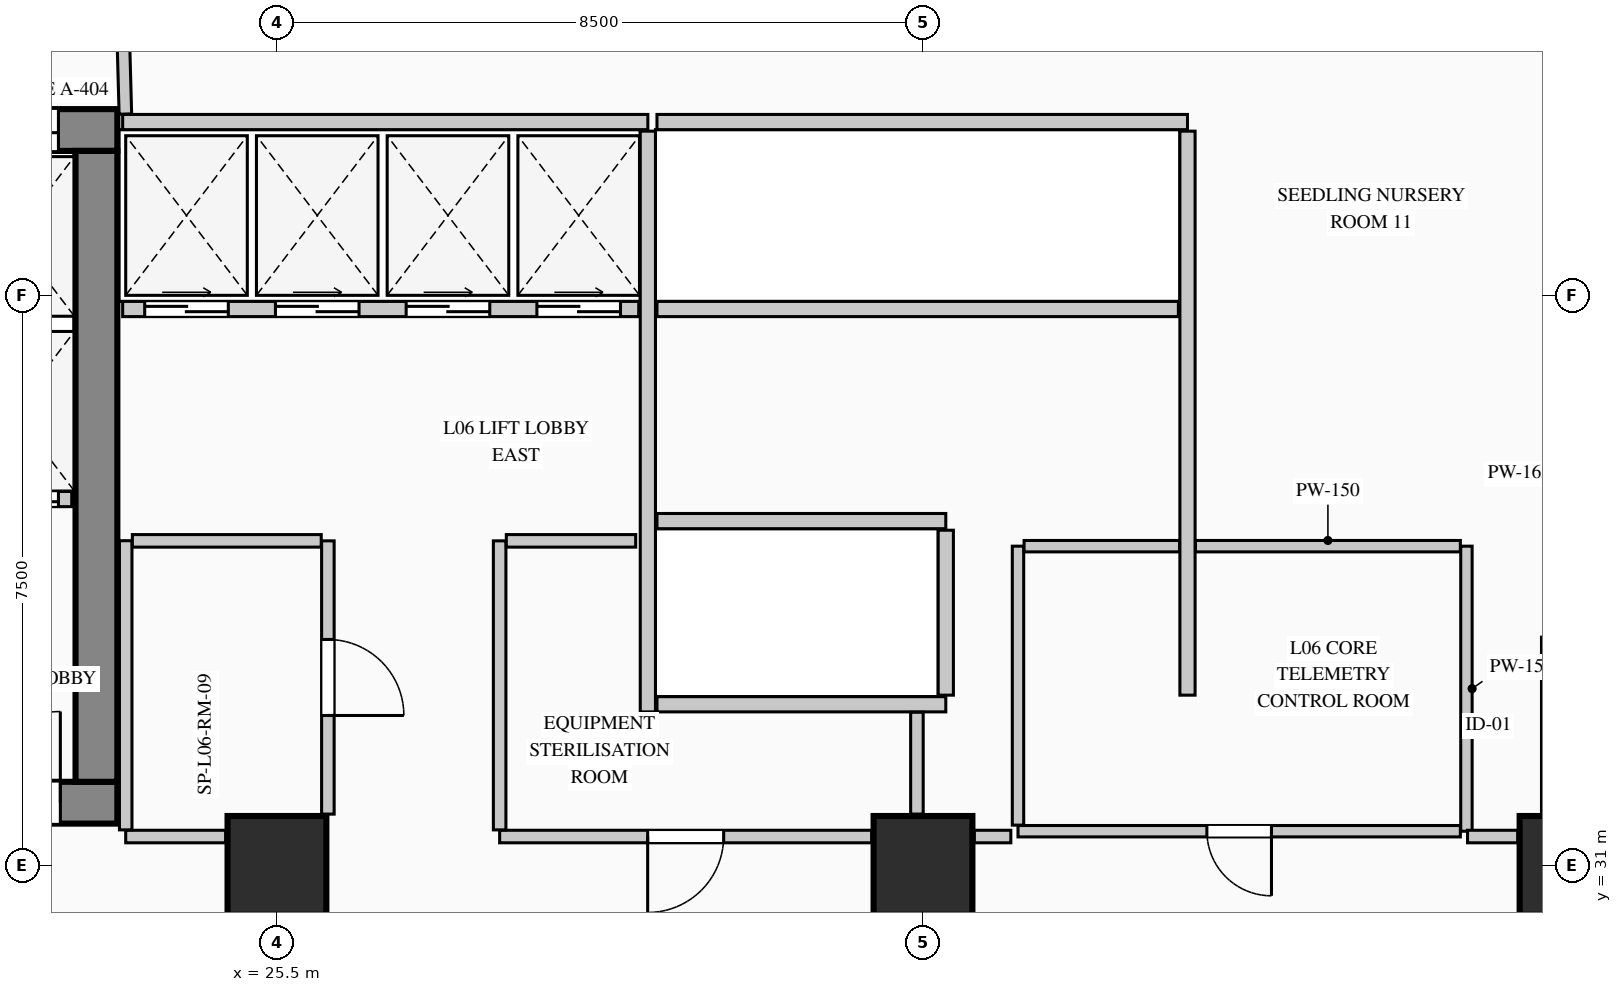
"""IFC4 building model, lengths in metres.
Left out: names, types, materials, properties, quantities, classifications, styles, units other than length and angle.
Written with IfcOpenShell. Run it as: python <this file> out.ifc"""

import sys

from ifc_helpers import new_model, si_unit, direction, frame, frame_2d, origin, origin_2d, place, context, subcontext, project, spatial, rectangle, extrude, element, fill, save


model = new_model("IFC4")
c1 = context("Model", 3, precision=1e-05, world=origin(), true_north=direction((0.0, 1.0)))
c2 = subcontext(c1, "Body", "Model", "MODEL_VIEW")
j1 = project(units=[si_unit("LENGTHUNIT", "METRE"), si_unit("PLANEANGLEUNIT", "RADIAN")], contexts=[c1])
p1 = place(None, origin())
s1 = spatial("IfcSite", under=j1, at=p1, CompositionType="ELEMENT")
p2 = place(p1, origin())
s2 = spatial("IfcBuilding", under=s1, at=p2, CompositionType="ELEMENT")
p3 = place(p2, frame((0.0, 0.0, 27.0)))
s3 = spatial("IfcBuildingStorey", under=s2, at=p3, CompositionType="ELEMENT", Elevation=27.0)
p4 = place(p3, frame((5.45, 40.675, 0.0), z_axis=(0.0, 0.0, 1.0), x_axis=(1.0, 0.0, 0.0)))
e1 = element("IfcWall", 1, at=p4, inside=s3, PredefinedType="SHEAR", context=c2, shape_type="SweptSolid", body=[
    extrude(rectangle(XDim=17.95, YDim=0.55, at=frame_2d((8.975, 0.0))), origin(), (0.0, 0.0, 1.0), 4.4),
])
p5 = place(p4, frame((15.995, 0.0, 0.0)))
e2 = element("IfcOpeningElement", 2, at=p5, cuts=e1, PredefinedType="OPENING", context=c2, shape_type="SweptSolid", body=[
    extrude(rectangle(XDim=1.18, YDim=2.25, at=frame_2d((0.59, 1.125))), frame((0.0, 0.285, 0.0), z_axis=(0.0, -1.0, 0.0), x_axis=(1.0, 0.0, 0.0)), (0.0, 0.0, 1.0), 0.57),
])
p6 = place(p3, frame((5.45, 31.825, 0.0), z_axis=(0.0, 0.0, 1.0), x_axis=(1.0, 0.0, 0.0)))
e3 = element("IfcWall", 3, at=p6, inside=s3, PredefinedType="SHEAR", context=c2, shape_type="SweptSolid", body=[
    extrude(rectangle(XDim=17.95, YDim=0.55, at=frame_2d((8.975, 0.0))), origin(), (0.0, 0.0, 1.0), 4.4),
])
p7 = place(p6, frame((3.2, 0.0, 0.0)))
e4 = element("IfcOpeningElement", 4, at=p7, cuts=e3, PredefinedType="OPENING", context=c2, shape_type="SweptSolid", body=[
    extrude(rectangle(XDim=1.2, YDim=2.2, at=frame_2d((0.6, 1.1))), frame((0.0, 0.285, 0.0), z_axis=(0.0, -1.0, 0.0), x_axis=(1.0, 0.0, 0.0)), (0.0, 0.0, 1.0), 0.57),
])
p8 = place(p6, frame((7.05, 0.0, 0.0)))
e5 = element("IfcOpeningElement", 5, at=p8, cuts=e3, PredefinedType="OPENING", context=c2, shape_type="SweptSolid", body=[
    extrude(rectangle(XDim=1.2, YDim=2.2, at=frame_2d((0.6, 1.1))), frame((0.0, 0.285, 0.0), z_axis=(0.0, -1.0, 0.0), x_axis=(1.0, 0.0, 0.0)), (0.0, 0.0, 1.0), 0.57),
])
p9 = place(p6, frame((8.9, 0.0, 0.0)))
e6 = element("IfcOpeningElement", 6, at=p9, cuts=e3, PredefinedType="OPENING", context=c2, shape_type="SweptSolid", body=[
    extrude(rectangle(XDim=1.15, YDim=2.2, at=frame_2d((0.575, 1.1))), frame((0.0, 0.285, 0.0), z_axis=(0.0, -1.0, 0.0), x_axis=(1.0, 0.0, 0.0)), (0.0, 0.0, 1.0), 0.57),
])
p10 = place(p6, frame((16.0, 0.0, 0.0)))
e7 = element("IfcOpeningElement", 7, at=p10, cuts=e3, PredefinedType="OPENING", context=c2, shape_type="SweptSolid", body=[
    extrude(rectangle(XDim=1.2, YDim=2.2, at=frame_2d((0.6, 1.1))), frame((0.0, 0.285, 0.0), z_axis=(0.0, -1.0, 0.0), x_axis=(1.0, 0.0, 0.0)), (0.0, 0.0, 1.0), 0.57),
])
p11 = place(p3, frame((23.125, 32.1, 0.0), z_axis=(0.0, 0.0, 1.0), x_axis=(0.0, 1.0, 0.0)))
e8 = element("IfcWall", 8, at=p11, inside=s3, PredefinedType="SHEAR", context=c2, shape_type="SweptSolid", body=[
    extrude(rectangle(XDim=8.3, YDim=0.55, at=frame_2d((4.15, 0.0))), origin(), (0.0, 0.0, 1.0), 4.4),
])
for number, where, z_axis, x_axis in (
    (9, (25.5, 31.0, 0.0), (0.0, 0.0, 1.0), (1.0, 0.0, 0.0)),
    (10, (34.0, 31.0, 0.0), (0.0, 0.0, 1.0), (1.0, 0.0, 0.0)),
    (11, (42.5, 31.0, 0.0), (0.0, 0.0, 1.0), (1.0, 0.0, 0.0)),
):
    element("IfcColumn", number, at=place(p3, frame(where, z_axis=z_axis, x_axis=x_axis)), inside=s3, PredefinedType="COLUMN", context=c2, shape_type="SweptSolid", body=[
        extrude(rectangle(XDim=1.3, YDim=1.3, at=origin_2d()), origin(), (0.0, 0.0, 1.0), 4.4),
    ])
p12 = place(p3, frame((21.3, 35.82, 0.0), z_axis=(0.0, 0.0, 1.0), x_axis=(1.0, 0.0, 0.0)))
e12 = element("IfcWall", 12, at=p12, inside=s3, PredefinedType="PARTITIONING", context=c2, shape_type="SweptSolid", body=[
    extrude(rectangle(XDim=1.5, YDim=0.2, at=frame_2d((0.75, 0.0))), origin(), (0.0, 0.0, 1.0), 4.1),
])
p13 = place(p12, frame((0.145, 0.0, 0.0)))
e13 = element("IfcOpeningElement", 13, at=p13, cuts=e12, PredefinedType="OPENING", context=c2, shape_type="SweptSolid", body=[
    extrude(rectangle(XDim=1.18, YDim=2.25, at=frame_2d((0.59, 1.125))), frame((0.0, 0.11, 0.0), z_axis=(0.0, -1.0, 0.0), x_axis=(1.0, 0.0, 0.0)), (0.0, 0.0, 1.0), 0.22),
])
p14 = place(p3, frame((23.47, 40.78, 0.0), z_axis=(0.0, 0.0, 1.0), x_axis=(1.0, 0.0, 0.0)))
e14 = element("IfcWall", 14, at=p14, inside=s3, PredefinedType="PARTITIONING", context=c2, shape_type="SweptSolid", body=[
    extrude(rectangle(XDim=6.91, YDim=0.2, at=frame_2d((3.455, 0.0))), origin(), (0.0, 0.0, 1.0), 4.1),
])
p15 = place(p3, frame((30.38, 33.02, 0.0), z_axis=(0.0, 0.0, 1.0), x_axis=(0.0, 1.0, 0.0)))
e15 = element("IfcWall", 15, at=p15, inside=s3, PredefinedType="PARTITIONING", context=c2, shape_type="SweptSolid", body=[
    extrude(rectangle(XDim=7.64, YDim=0.2, at=frame_2d((3.82, 0.0))), origin(), (0.0, 0.0, 1.0), 4.1),
])
p16 = place(p3, frame((23.47, 38.32, 0.0), z_axis=(0.0, 0.0, 1.0), x_axis=(1.0, 0.0, 0.0)))
e16 = element("IfcWall", 16, at=p16, inside=s3, PredefinedType="PARTITIONING", context=c2, shape_type="SweptSolid", body=[
    extrude(rectangle(XDim=6.79, YDim=0.2, at=frame_2d((3.395, 0.0))), origin(), (0.0, 0.0, 1.0), 4.1),
])
p17 = place(p16, frame((0.29, 0.0, 0.0)))
e17 = element("IfcOpeningElement", 17, at=p17, cuts=e16, PredefinedType="OPENING", context=c2, shape_type="SweptSolid", body=[
    extrude(rectangle(XDim=1.1, YDim=2.2, at=frame_2d((0.55, 1.1))), frame((0.0, 0.11, 0.0), z_axis=(0.0, -1.0, 0.0), x_axis=(1.0, 0.0, 0.0)), (0.0, 0.0, 1.0), 0.22),
])
p18 = place(p16, frame((2.01, 0.0, 0.0)))
e18 = element("IfcOpeningElement", 18, at=p18, cuts=e16, PredefinedType="OPENING", context=c2, shape_type="SweptSolid", body=[
    extrude(rectangle(XDim=1.1, YDim=2.2, at=frame_2d((0.55, 1.1))), frame((0.0, 0.11, 0.0), z_axis=(0.0, -1.0, 0.0), x_axis=(1.0, 0.0, 0.0)), (0.0, 0.0, 1.0), 0.22),
])
p19 = place(p16, frame((3.73, 0.0, 0.0)))
e19 = element("IfcOpeningElement", 19, at=p19, cuts=e16, PredefinedType="OPENING", context=c2, shape_type="SweptSolid", body=[
    extrude(rectangle(XDim=1.1, YDim=2.2, at=frame_2d((0.55, 1.1))), frame((0.0, 0.11, 0.0), z_axis=(0.0, -1.0, 0.0), x_axis=(1.0, 0.0, 0.0)), (0.0, 0.0, 1.0), 0.22),
])
p20 = place(p16, frame((5.45, 0.0, 0.0)))
e20 = element("IfcOpeningElement", 20, at=p20, cuts=e16, PredefinedType="OPENING", context=c2, shape_type="SweptSolid", body=[
    extrude(rectangle(XDim=1.1, YDim=2.2, at=frame_2d((0.55, 1.1))), frame((0.0, 0.11, 0.0), z_axis=(0.0, -1.0, 0.0), x_axis=(1.0, 0.0, 0.0)), (0.0, 0.0, 1.0), 0.22),
])
p21 = place(p3, frame((30.5, 40.78, 0.0), z_axis=(0.0, 0.0, 1.0), x_axis=(1.0, 0.0, 0.0)))
e21 = element("IfcWall", 21, at=p21, inside=s3, PredefinedType="PARTITIONING", context=c2, shape_type="SweptSolid", body=[
    extrude(rectangle(XDim=6.98, YDim=0.2, at=frame_2d((3.49, 0.0))), origin(), (0.0, 0.0, 1.0), 4.1),
])
p22 = place(p3, frame((37.48, 33.24, 0.0), z_axis=(0.0, 0.0, 1.0), x_axis=(0.0, 1.0, 0.0)))
e22 = element("IfcWall", 22, at=p22, inside=s3, PredefinedType="PARTITIONING", context=c2, shape_type="SweptSolid", body=[
    extrude(rectangle(XDim=7.42, YDim=0.2, at=frame_2d((3.71, 0.0))), origin(), (0.0, 0.0, 1.0), 4.1),
])
p23 = place(p3, frame((30.5, 38.32, 0.0), z_axis=(0.0, 0.0, 1.0), x_axis=(1.0, 0.0, 0.0)))
e23 = element("IfcWall", 23, at=p23, inside=s3, PredefinedType="PARTITIONING", context=c2, shape_type="SweptSolid", body=[
    extrude(rectangle(XDim=6.86, YDim=0.2, at=frame_2d((3.43, 0.0))), origin(), (0.0, 0.0, 1.0), 4.1),
])
for number, where, z_axis, x_axis in (
    (24, (30.5, 35.53, 0.0), (0.0, 0.0, 1.0), (1.0, 0.0, 0.0)),
    (25, (30.5, 33.12, 0.0), (0.0, 0.0, 1.0), (1.0, 0.0, 0.0)),
):
    element("IfcWall", number, at=place(p3, frame(where, z_axis=z_axis, x_axis=x_axis)), inside=s3, PredefinedType="PARTITIONING", context=c2, shape_type="SweptSolid", body=[
        extrude(rectangle(XDim=3.8, YDim=0.2, at=frame_2d((1.9, 0.0))), origin(), (0.0, 0.0, 1.0), 4.1),
    ])
p24 = place(p3, frame((34.3, 33.24, 0.0), z_axis=(0.0, 0.0, 1.0), x_axis=(0.0, 1.0, 0.0)))
e26 = element("IfcWall", 26, at=p24, inside=s3, PredefinedType="PARTITIONING", context=c2, shape_type="SweptSolid", body=[
    extrude(rectangle(XDim=2.17, YDim=0.2, at=frame_2d((1.085, 0.0))), origin(), (0.0, 0.0, 1.0), 4.1),
])
p25 = place(p3, frame((41.15, 35.2, 0.0), z_axis=(0.0, 0.0, 1.0), x_axis=(0.0, -1.0, 0.0)))
e27 = element("IfcWall", 27, at=p25, inside=s3, PredefinedType="PARTITIONING", context=c2, shape_type="SweptSolid", body=[
    extrude(rectangle(XDim=3.75, YDim=0.15, at=frame_2d((1.875, 0.0))), origin(), (0.0, 0.0, 1.0), 4.1),
])
p26 = place(p3, frame((41.07, 31.45, 0.0), z_axis=(0.0, 0.0, 1.0), x_axis=(-1.0, 0.0, 0.0)))
e28 = element("IfcWall", 28, at=p26, inside=s3, PredefinedType="PARTITIONING", context=c2, shape_type="SweptSolid", body=[
    extrude(rectangle(XDim=5.82, YDim=0.15, at=frame_2d((2.91, 0.0))), origin(), (0.0, 0.0, 1.0), 4.1),
])
p27 = place(p26, frame((2.485, 0.0, 0.0)))
e29 = element("IfcOpeningElement", 29, at=p27, cuts=e28, PredefinedType="OPENING", context=c2, shape_type="SweptSolid", body=[
    extrude(rectangle(XDim=0.85, YDim=2.1, at=frame_2d((0.425, 1.05))), frame((0.0, 0.085, 0.0), z_axis=(0.0, -1.0, 0.0), x_axis=(1.0, 0.0, 0.0)), (0.0, 0.0, 1.0), 0.17),
])
p28 = place(p3, frame((35.25, 31.53, 0.0), z_axis=(0.0, 0.0, 1.0), x_axis=(0.0, 1.0, 0.0)))
e30 = element("IfcWall", 30, at=p28, inside=s3, PredefinedType="PARTITIONING", context=c2, shape_type="SweptSolid", body=[
    extrude(rectangle(XDim=3.67, YDim=0.15, at=frame_2d((1.835, 0.0))), origin(), (0.0, 0.0, 1.0), 4.1),
])
p29 = place(p3, frame((35.33, 35.2, 0.0), z_axis=(0.0, 0.0, 1.0), x_axis=(1.0, 0.0, 0.0)))
e31 = element("IfcWall", 31, at=p29, inside=s3, PredefinedType="PARTITIONING", context=c2, shape_type="SweptSolid", body=[
    extrude(rectangle(XDim=2.045, YDim=0.15, at=frame_2d((1.022, 0.0))), origin(), (0.0, 0.0, 1.0), 4.1),
])
p30 = place(p3, frame((37.585, 35.2, 0.0), z_axis=(0.0, 0.0, 1.0), x_axis=(1.0, 0.0, 0.0)))
e32 = element("IfcWall", 32, at=p30, inside=s3, PredefinedType="PARTITIONING", context=c2, shape_type="SweptSolid", body=[
    extrude(rectangle(XDim=3.485, YDim=0.15, at=frame_2d((1.743, 0.0))), origin(), (0.0, 0.0, 1.0), 4.1),
])
p31 = place(p3, frame((33.92, 33.015, 0.0), z_axis=(0.0, 0.0, 1.0), x_axis=(0.0, -1.0, 0.0)))
e33 = element("IfcWall", 33, at=p31, inside=s3, PredefinedType="PARTITIONING", context=c2, shape_type="SweptSolid", body=[
    extrude(rectangle(XDim=1.34, YDim=0.165, at=frame_2d((0.67, 0.0))), origin(), (0.0, 0.0, 1.0), 4.1),
])
p32 = place(p3, frame((33.325, 31.38, 0.0), z_axis=(0.0, 0.0, 1.0), x_axis=(-1.0, 0.0, 0.0)))
e34 = element("IfcWall", 34, at=p32, inside=s3, PredefinedType="PARTITIONING", context=c2, shape_type="SweptSolid", body=[
    extrude(rectangle(XDim=4.895, YDim=0.165, at=frame_2d((2.448, 0.0))), origin(), (0.0, 0.0, 1.0), 4.1),
])
p33 = place(p32, frame((1.948, 0.0, 0.0)))
e35 = element("IfcOpeningElement", 35, at=p33, cuts=e34, PredefinedType="OPENING", context=c2, shape_type="SweptSolid", body=[
    extrude(rectangle(XDim=1.0, YDim=2.15, at=frame_2d((0.5, 1.075))), frame((0.0, 0.093, 0.0), z_axis=(0.0, -1.0, 0.0), x_axis=(1.0, 0.0, 0.0)), (0.0, 0.0, 1.0), 0.185),
])
p34 = place(p3, frame((28.43, 31.468, 0.0), z_axis=(0.0, 0.0, 1.0), x_axis=(0.0, 1.0, 0.0)))
e36 = element("IfcWall", 36, at=p34, inside=s3, PredefinedType="PARTITIONING", context=c2, shape_type="SweptSolid", body=[
    extrude(rectangle(XDim=3.802, YDim=0.165, at=frame_2d((1.901, 0.0))), origin(), (0.0, 0.0, 1.0), 4.1),
])
p35 = place(p3, frame((28.518, 35.27, 0.0), z_axis=(0.0, 0.0, 1.0), x_axis=(1.0, 0.0, 0.0)))
e37 = element("IfcWall", 37, at=p35, inside=s3, PredefinedType="PARTITIONING", context=c2, shape_type="SweptSolid", body=[
    extrude(rectangle(XDim=1.702, YDim=0.165, at=frame_2d((0.851, 0.0))), origin(), (0.0, 0.0, 1.0), 4.1),
])
p36 = place(p3, frame((26.17, 35.27, 0.0), z_axis=(0.0, 0.0, 1.0), x_axis=(0.0, -1.0, 0.0)))
e38 = element("IfcWall", 38, at=p36, inside=s3, PredefinedType="PARTITIONING", context=c2, shape_type="SweptSolid", body=[
    extrude(rectangle(XDim=3.595, YDim=0.165, at=frame_2d((1.797, 0.0))), origin(), (0.0, 0.0, 1.0), 4.1),
])
p37 = place(p36, frame((1.298, 0.0, 0.0)))
e39 = element("IfcOpeningElement", 39, at=p37, cuts=e38, PredefinedType="OPENING", context=c2, shape_type="SweptSolid", body=[
    extrude(rectangle(XDim=1.0, YDim=2.15, at=frame_2d((0.5, 1.075))), frame((0.0, 0.093, 0.0), z_axis=(0.0, -1.0, 0.0), x_axis=(1.0, 0.0, 0.0)), (0.0, 0.0, 1.0), 0.185),
])
p38 = place(p3, frame((24.825, 31.38, 0.0), z_axis=(0.0, 0.0, 1.0), x_axis=(-1.0, 0.0, 0.0)))
e40 = element("IfcWall", 40, at=p38, inside=s3, PredefinedType="PARTITIONING", context=c2, shape_type="SweptSolid", body=[
    extrude(rectangle(XDim=1.315, YDim=0.165, at=frame_2d((0.657, 0.0))), origin(), (0.0, 0.0, 1.0), 4.1),
])
p39 = place(p3, frame((23.51, 31.468, 0.0), z_axis=(0.0, 0.0, 1.0), x_axis=(0.0, 1.0, 0.0)))
e41 = element("IfcWall", 41, at=p39, inside=s3, PredefinedType="PARTITIONING", context=c2, shape_type="SweptSolid", body=[
    extrude(rectangle(XDim=3.804, YDim=0.165, at=frame_2d((1.902, 0.0))), origin(), (0.0, 0.0, 1.0), 4.1),
])
p40 = place(p3, frame((23.597, 35.27, 0.0), z_axis=(0.0, 0.0, 1.0), x_axis=(1.0, 0.0, 0.0)))
e42 = element("IfcWall", 42, at=p40, inside=s3, PredefinedType="PARTITIONING", context=c2, shape_type="SweptSolid", body=[
    extrude(rectangle(XDim=2.485, YDim=0.165, at=frame_2d((1.243, 0.0))), origin(), (0.0, 0.0, 1.0), 4.1),
])
p41 = place(p3, frame((23.506, 40.885, 0.0), z_axis=(0.0, 0.0, 1.0), x_axis=(-0.027441464163, 0.999623412113, 0.0)))
e43 = element("IfcWall", 43, at=p41, inside=s3, PredefinedType="PARTITIONING", context=c2, shape_type="SweptSolid", body=[
    extrude(rectangle(XDim=2.331, YDim=0.165, at=frame_2d((1.166, 0.0))), origin(), (0.0, 0.0, 1.0), 4.1),
])
p42 = place(p3, frame((42.22, 34.003, 0.0), z_axis=(0.0, 0.0, 1.0), x_axis=(0.0, -1.0, 0.0)))
e44 = element("IfcWall", 44, at=p42, inside=s3, PredefinedType="PARTITIONING", context=c2, shape_type="SweptSolid", body=[
    extrude(rectangle(XDim=2.328, YDim=0.165, at=frame_2d((1.164, 0.0))), origin(), (0.0, 0.0, 1.0), 4.1),
])
p43 = place(p42, frame((0.664, 0.0, 0.0)))
e45 = element("IfcOpeningElement", 45, at=p43, cuts=e44, PredefinedType="OPENING", context=c2, shape_type="SweptSolid", body=[
    extrude(rectangle(XDim=1.0, YDim=2.15, at=frame_2d((0.5, 1.075))), frame((0.0, 0.093, 0.0), z_axis=(0.0, -1.0, 0.0), x_axis=(1.0, 0.0, 0.0)), (0.0, 0.0, 1.0), 0.185),
])
p44 = place(p3, frame((41.825, 31.38, 0.0), z_axis=(0.0, 0.0, 1.0), x_axis=(-1.0, 0.0, 0.0)))
e46 = element("IfcWall", 46, at=p44, inside=s3, PredefinedType="PARTITIONING", context=c2, shape_type="SweptSolid", body=[
    extrude(rectangle(XDim=0.66, YDim=0.165, at=frame_2d((0.33, 0.0))), origin(), (0.0, 0.0, 1.0), 4.1),
])
p45 = place(p3, frame((35.156, 31.38, 0.0), z_axis=(0.0, 0.0, 1.0), x_axis=(-1.0, 0.0, 0.0)))
e47 = element("IfcWall", 47, at=p45, inside=s3, PredefinedType="PARTITIONING", context=c2, shape_type="SweptSolid", body=[
    extrude(rectangle(XDim=0.48, YDim=0.165, at=frame_2d((0.24, 0.0))), origin(), (0.0, 0.0, 1.0), 4.1),
])
p46 = place(p10, origin())
e48 = element("IfcDoor", 48, at=p46, inside=s3, OperationType="SINGLE_SWING_RIGHT", PredefinedType="DOOR", context=c2, shape_type="SweptSolid", body=[
    extrude(rectangle(XDim=1.2, YDim=2.2, at=frame_2d((0.6, 1.1))), frame((0.0, 0.025, 0.0), z_axis=(0.0, -1.0, 0.0), x_axis=(1.0, 0.0, 0.0)), (0.0, 0.0, 1.0), 0.05),
])
fill(e7, e48)
p47 = place(p5, origin())
e49 = element("IfcDoor", 49, at=p47, inside=s3, OperationType="DOUBLE_DOOR_SLIDING", PredefinedType="DOOR", context=c2, shape_type="SweptSolid", body=[
    extrude(rectangle(XDim=1.18, YDim=2.25, at=frame_2d((0.59, 1.125))), frame((0.0, 0.025, 0.0), z_axis=(0.0, -1.0, 0.0), x_axis=(1.0, 0.0, 0.0)), (0.0, 0.0, 1.0), 0.05),
])
fill(e2, e49)
p48 = place(p13, origin())
e50 = element("IfcDoor", 50, at=p48, inside=s3, OperationType="DOUBLE_DOOR_SLIDING", PredefinedType="DOOR", context=c2, shape_type="SweptSolid", body=[
    extrude(rectangle(XDim=1.18, YDim=2.25, at=frame_2d((0.59, 1.125))), frame((0.0, 0.025, 0.0), z_axis=(0.0, -1.0, 0.0), x_axis=(1.0, 0.0, 0.0)), (0.0, 0.0, 1.0), 0.05),
])
fill(e13, e50)
p49 = place(p17, origin())
e51 = element("IfcDoor", 51, at=p49, inside=s3, OperationType="DOUBLE_DOOR_SLIDING", PredefinedType="DOOR", context=c2, shape_type="SweptSolid", body=[
    extrude(rectangle(XDim=1.1, YDim=2.2, at=frame_2d((0.55, 1.1))), frame((0.0, 0.025, 0.0), z_axis=(0.0, -1.0, 0.0), x_axis=(1.0, 0.0, 0.0)), (0.0, 0.0, 1.0), 0.05),
])
fill(e17, e51)
p50 = place(p18, origin())
e52 = element("IfcDoor", 52, at=p50, inside=s3, OperationType="DOUBLE_DOOR_SLIDING", PredefinedType="DOOR", context=c2, shape_type="SweptSolid", body=[
    extrude(rectangle(XDim=1.1, YDim=2.2, at=frame_2d((0.55, 1.1))), frame((0.0, 0.025, 0.0), z_axis=(0.0, -1.0, 0.0), x_axis=(1.0, 0.0, 0.0)), (0.0, 0.0, 1.0), 0.05),
])
fill(e18, e52)
p51 = place(p19, origin())
e53 = element("IfcDoor", 53, at=p51, inside=s3, OperationType="DOUBLE_DOOR_SLIDING", PredefinedType="DOOR", context=c2, shape_type="SweptSolid", body=[
    extrude(rectangle(XDim=1.1, YDim=2.2, at=frame_2d((0.55, 1.1))), frame((0.0, 0.025, 0.0), z_axis=(0.0, -1.0, 0.0), x_axis=(1.0, 0.0, 0.0)), (0.0, 0.0, 1.0), 0.05),
])
fill(e19, e53)
p52 = place(p20, origin())
e54 = element("IfcDoor", 54, at=p52, inside=s3, OperationType="DOUBLE_DOOR_SLIDING", PredefinedType="DOOR", context=c2, shape_type="SweptSolid", body=[
    extrude(rectangle(XDim=1.1, YDim=2.2, at=frame_2d((0.55, 1.1))), frame((0.0, 0.025, 0.0), z_axis=(0.0, -1.0, 0.0), x_axis=(1.0, 0.0, 0.0)), (0.0, 0.0, 1.0), 0.05),
])
fill(e20, e54)
p53 = place(p27, origin())
e55 = element("IfcDoor", 55, at=p53, inside=s3, OperationType="SINGLE_SWING_LEFT", PredefinedType="DOOR", context=c2, shape_type="SweptSolid", body=[
    extrude(rectangle(XDim=0.85, YDim=2.1, at=frame_2d((0.425, 1.05))), frame((0.0, 0.025, 0.0), z_axis=(0.0, -1.0, 0.0), x_axis=(1.0, 0.0, 0.0)), (0.0, 0.0, 1.0), 0.05),
])
fill(e29, e55)
p54 = place(p33, origin())
e56 = element("IfcDoor", 56, at=p54, inside=s3, OperationType="SINGLE_SWING_RIGHT", PredefinedType="DOOR", context=c2, shape_type="SweptSolid", body=[
    extrude(rectangle(XDim=1.0, YDim=2.15, at=frame_2d((0.5, 1.075))), frame((0.0, 0.025, 0.0), z_axis=(0.0, -1.0, 0.0), x_axis=(1.0, 0.0, 0.0)), (0.0, 0.0, 1.0), 0.05),
])
fill(e35, e56)
p55 = place(p37, origin())
e57 = element("IfcDoor", 57, at=p55, inside=s3, OperationType="SINGLE_SWING_RIGHT", PredefinedType="DOOR", context=c2, shape_type="SweptSolid", body=[
    extrude(rectangle(XDim=1.0, YDim=2.15, at=frame_2d((0.5, 1.075))), frame((0.0, 0.025, 0.0), z_axis=(0.0, -1.0, 0.0), x_axis=(1.0, 0.0, 0.0)), (0.0, 0.0, 1.0), 0.05),
])
fill(e39, e57)
save(model, sys.argv[1])
